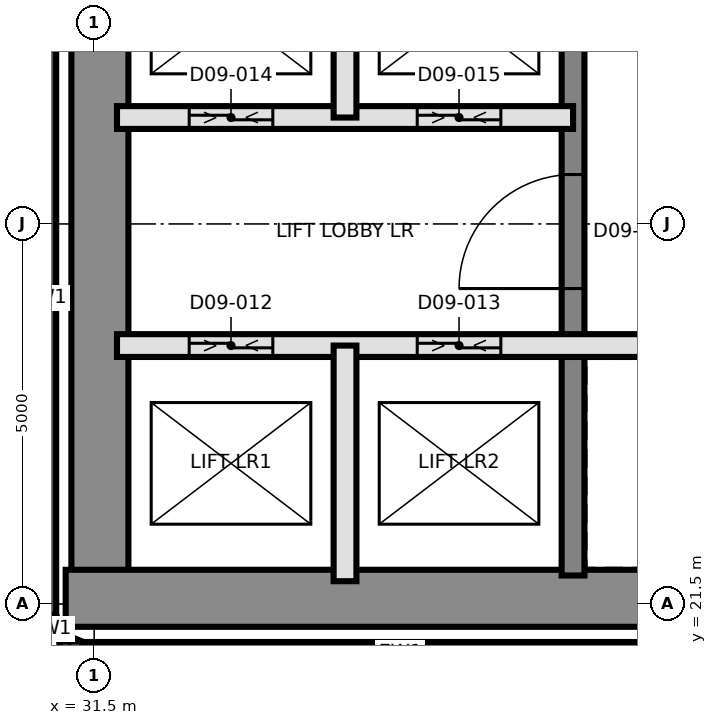
"""IFC4 building model, lengths in metres.
Left out: names, types, materials, properties, quantities, classifications, styles, units other than length and angle.
Written with IfcOpenShell. Run it as: python <this file> out.ifc"""

import sys

from ifc_helpers import new_model, si_unit, direction, frame, frame_2d, origin, place, context, subcontext, project, spatial, rectangle, extrude, element, fill, save


model = new_model("IFC4")
c1 = context("Model", 3, precision=1e-05, world=origin(), true_north=direction((0.0, 1.0)))
c2 = subcontext(c1, "Body", "Model", "MODEL_VIEW")
j1 = project(units=[si_unit("LENGTHUNIT", "METRE"), si_unit("PLANEANGLEUNIT", "RADIAN")], contexts=[c1])
p1 = place(None, origin())
s1 = spatial("IfcSite", under=j1, at=p1, CompositionType="ELEMENT")
p2 = place(p1, origin())
s2 = spatial("IfcBuilding", under=s1, at=p2, CompositionType="ELEMENT")
p3 = place(p2, frame((0.0, 0.0, 109.3)))
s3 = spatial("IfcBuildingStorey", under=s2, at=p3, CompositionType="ELEMENT", Elevation=109.3)
p4 = place(p3, frame((31.575, 21.875, 0.0), z_axis=(0.0, 0.0, 1.0), x_axis=(0.0, 1.0, 0.0)))
e1 = element("IfcWall", 1, at=p4, inside=s3, PredefinedType="SHEAR", context=c2, shape_type="SweptSolid", body=[
    extrude(rectangle(XDim=17.25, YDim=0.75, at=frame_2d((8.625, 0.0))), origin(), (0.0, 0.0, 1.0), 3.7),
])
p5 = place(p3, frame((31.125, 21.575, 0.0), z_axis=(0.0, 0.0, 1.0), x_axis=(1.0, 0.0, 0.0)))
e2 = element("IfcWall", 2, at=p5, inside=s3, PredefinedType="SHEAR", context=c2, shape_type="SweptSolid", body=[
    extrude(rectangle(XDim=27.0, YDim=0.75, at=frame_2d((13.5, 0.0))), origin(), (0.0, 0.0, 1.0), 3.7),
])
p6 = place(p3, frame((37.8, 21.875, 0.0), z_axis=(0.0, 0.0, 1.0), x_axis=(0.0, 1.0, 0.0)))
e3 = element("IfcWall", 3, at=p6, inside=s3, PredefinedType="SHEAR", context=c2, shape_type="SweptSolid", body=[
    extrude(rectangle(XDim=8.625, YDim=0.3, at=frame_2d((4.312, 0.0))), origin(), (0.0, 0.0, 1.0), 3.7),
])
p7 = place(p6, frame((3.775, 0.0, 0.0)))
e4 = element("IfcOpeningElement", 4, at=p7, cuts=e3, PredefinedType="OPENING", context=c2, shape_type="SweptSolid", body=[
    extrude(rectangle(XDim=1.5, YDim=2.1, at=frame_2d((0.75, 1.05))), frame((0.0, 0.16, 0.0), z_axis=(0.0, -1.0, 0.0), x_axis=(1.0, 0.0, 0.0)), (0.0, 0.0, 1.0), 0.32),
])
p8 = place(p3, frame((30.85, 29.699, 0.0), z_axis=(0.0, 0.0, 1.0), x_axis=(0.0, -1.0, 0.0)))
e5 = element("IfcWall", 5, at=p8, inside=s3, PredefinedType="SOLIDWALL", context=c2, shape_type="SweptSolid", body=[
    extrude(rectangle(XDim=8.34, YDim=0.3, at=frame_2d((4.17, 0.0))), origin(), (0.0, 0.0, 1.0), 3.4),
])
for number, where, z_axis, x_axis in (
    (6, (30.861, 21.302, 0.0), (0.0, 0.0, 1.0), (0.383, -0.924, 0.0)),
    (7, (31.048, 20.967, 0.0), (0.0, 0.0, 1.0), (0.924, -0.383, 0.0)),
):
    element("IfcWall", number, at=place(p3, frame(where, z_axis=z_axis, x_axis=x_axis)), inside=s3, PredefinedType="SOLIDWALL", context=c2, shape_type="SweptSolid", body=[
        extrude(rectangle(XDim=0.275, YDim=0.3, at=frame_2d((0.138, 0.0))), origin(), (0.0, 0.0, 1.0), 3.4),
    ])
p9 = place(p3, frame((31.36, 20.85, 0.0), z_axis=(0.0, 0.0, 1.0), x_axis=(1.0, 0.0, 0.0)))
e8 = element("IfcWall", 8, at=p9, inside=s3, PredefinedType="SOLIDWALL", context=c2, shape_type="SweptSolid", body=[
    extrude(rectangle(XDim=8.34, YDim=0.3, at=frame_2d((4.17, 0.0))), origin(), (0.0, 0.0, 1.0), 3.4),
])
p10 = place(p3, frame((31.8, 24.9, 0.0), z_axis=(0.0, 0.0, 1.0), x_axis=(1.0, 0.0, 0.0)))
e9 = element("IfcWall", 9, at=p10, inside=s3, PredefinedType="SOLIDWALL", context=c2, shape_type="SweptSolid", body=[
    extrude(rectangle(XDim=9.0, YDim=0.3, at=frame_2d((4.5, 0.0))), origin(), (0.0, 0.0, 1.0), 3.4),
])
p11 = place(p10, frame((7.05, 0.0, 0.0)))
e10 = element("IfcOpeningElement", 10, at=p11, cuts=e9, PredefinedType="OPENING", context=c2, shape_type="SweptSolid", body=[
    extrude(rectangle(XDim=0.9, YDim=2.1, at=frame_2d((0.45, 1.05))), frame((0.0, 0.16, 0.0), z_axis=(0.0, -1.0, 0.0), x_axis=(1.0, 0.0, 0.0)), (0.0, 0.0, 1.0), 0.32),
])
p12 = place(p10, frame((0.95, 0.0, 0.0)))
e11 = element("IfcOpeningElement", 11, at=p12, cuts=e9, PredefinedType="OPENING", context=c2, shape_type="SweptSolid", body=[
    extrude(rectangle(XDim=1.1, YDim=2.4, at=frame_2d((0.55, 1.2))), frame((0.0, 0.16, 0.0), z_axis=(0.0, -1.0, 0.0), x_axis=(1.0, 0.0, 0.0)), (0.0, 0.0, 1.0), 0.32),
])
p13 = place(p10, frame((3.95, 0.0, 0.0)))
e12 = element("IfcOpeningElement", 12, at=p13, cuts=e9, PredefinedType="OPENING", context=c2, shape_type="SweptSolid", body=[
    extrude(rectangle(XDim=1.1, YDim=2.4, at=frame_2d((0.55, 1.2))), frame((0.0, 0.16, 0.0), z_axis=(0.0, -1.0, 0.0), x_axis=(1.0, 0.0, 0.0)), (0.0, 0.0, 1.0), 0.32),
])
p14 = place(p3, frame((31.8, 27.9, 0.0), z_axis=(0.0, 0.0, 1.0), x_axis=(1.0, 0.0, 0.0)))
e13 = element("IfcWall", 13, at=p14, inside=s3, PredefinedType="SOLIDWALL", context=c2, shape_type="SweptSolid", body=[
    extrude(rectangle(XDim=6.0, YDim=0.3, at=frame_2d((3.0, 0.0))), origin(), (0.0, 0.0, 1.0), 3.4),
])
p15 = place(p14, frame((0.95, 0.0, 0.0)))
e14 = element("IfcOpeningElement", 14, at=p15, cuts=e13, PredefinedType="OPENING", context=c2, shape_type="SweptSolid", body=[
    extrude(rectangle(XDim=1.1, YDim=2.4, at=frame_2d((0.55, 1.2))), frame((0.0, 0.16, 0.0), z_axis=(0.0, -1.0, 0.0), x_axis=(1.0, 0.0, 0.0)), (0.0, 0.0, 1.0), 0.32),
])
p16 = place(p14, frame((3.95, 0.0, 0.0)))
e15 = element("IfcOpeningElement", 15, at=p16, cuts=e13, PredefinedType="OPENING", context=c2, shape_type="SweptSolid", body=[
    extrude(rectangle(XDim=1.1, YDim=2.4, at=frame_2d((0.55, 1.2))), frame((0.0, 0.16, 0.0), z_axis=(0.0, -1.0, 0.0), x_axis=(1.0, 0.0, 0.0)), (0.0, 0.0, 1.0), 0.32),
])
p17 = place(p3, frame((34.8, 21.8, 0.0), z_axis=(0.0, 0.0, 1.0), x_axis=(0.0, 1.0, 0.0)))
e16 = element("IfcWall", 16, at=p17, inside=s3, PredefinedType="SOLIDWALL", context=c2, shape_type="SweptSolid", body=[
    extrude(rectangle(XDim=3.1, YDim=0.3, at=frame_2d((1.55, 0.0))), origin(), (0.0, 0.0, 1.0), 3.4),
])
p18 = place(p3, frame((34.8, 27.9, 0.0), z_axis=(0.0, 0.0, 1.0), x_axis=(0.0, 1.0, 0.0)))
e17 = element("IfcWall", 17, at=p18, inside=s3, PredefinedType="SOLIDWALL", context=c2, shape_type="SweptSolid", body=[
    extrude(rectangle(XDim=5.45, YDim=0.3, at=frame_2d((2.725, 0.0))), origin(), (0.0, 0.0, 1.0), 3.4),
])
p19 = place(p18, frame((3.6, 0.0, 0.0)))
e18 = element("IfcOpeningElement", 18, at=p19, cuts=e17, PredefinedType="OPENING", context=c2, shape_type="SweptSolid", body=[
    extrude(rectangle(XDim=1.0, YDim=2.1, at=frame_2d((0.5, 1.05))), frame((0.0, 0.16, 0.0), z_axis=(0.0, -1.0, 0.0), x_axis=(1.0, 0.0, 0.0)), (0.0, 0.0, 1.0), 0.32),
])
p20 = place(p7, origin())
e19 = element("IfcDoor", 19, at=p20, inside=s3, OperationType="SINGLE_SWING_LEFT", PredefinedType="DOOR", context=c2, shape_type="SweptSolid", body=[
    extrude(rectangle(XDim=1.5, YDim=2.1, at=frame_2d((0.75, 1.05))), frame((0.0, 0.025, 0.0), z_axis=(0.0, -1.0, 0.0), x_axis=(1.0, 0.0, 0.0)), (0.0, 0.0, 1.0), 0.05),
])
fill(e4, e19)
p21 = place(p12, origin())
e20 = element("IfcDoor", 20, at=p21, inside=s3, OperationType="SLIDING_TO_LEFT", PredefinedType="DOOR", context=c2, shape_type="SweptSolid", body=[
    extrude(rectangle(XDim=1.1, YDim=2.4, at=frame_2d((0.55, 1.2))), frame((0.0, 0.025, 0.0), z_axis=(0.0, -1.0, 0.0), x_axis=(1.0, 0.0, 0.0)), (0.0, 0.0, 1.0), 0.05),
])
fill(e11, e20)
p22 = place(p13, origin())
e21 = element("IfcDoor", 21, at=p22, inside=s3, OperationType="SLIDING_TO_LEFT", PredefinedType="DOOR", context=c2, shape_type="SweptSolid", body=[
    extrude(rectangle(XDim=1.1, YDim=2.4, at=frame_2d((0.55, 1.2))), frame((0.0, 0.025, 0.0), z_axis=(0.0, -1.0, 0.0), x_axis=(1.0, 0.0, 0.0)), (0.0, 0.0, 1.0), 0.05),
])
fill(e12, e21)
p23 = place(p15, origin())
e22 = element("IfcDoor", 22, at=p23, inside=s3, OperationType="SLIDING_TO_LEFT", PredefinedType="DOOR", context=c2, shape_type="SweptSolid", body=[
    extrude(rectangle(XDim=1.1, YDim=2.4, at=frame_2d((0.55, 1.2))), frame((0.0, 0.025, 0.0), z_axis=(0.0, -1.0, 0.0), x_axis=(1.0, 0.0, 0.0)), (0.0, 0.0, 1.0), 0.05),
])
fill(e14, e22)
p24 = place(p16, origin())
e23 = element("IfcDoor", 23, at=p24, inside=s3, OperationType="SLIDING_TO_LEFT", PredefinedType="DOOR", context=c2, shape_type="SweptSolid", body=[
    extrude(rectangle(XDim=1.1, YDim=2.4, at=frame_2d((0.55, 1.2))), frame((0.0, 0.025, 0.0), z_axis=(0.0, -1.0, 0.0), x_axis=(1.0, 0.0, 0.0)), (0.0, 0.0, 1.0), 0.05),
])
fill(e15, e23)
save(model, sys.argv[1])
